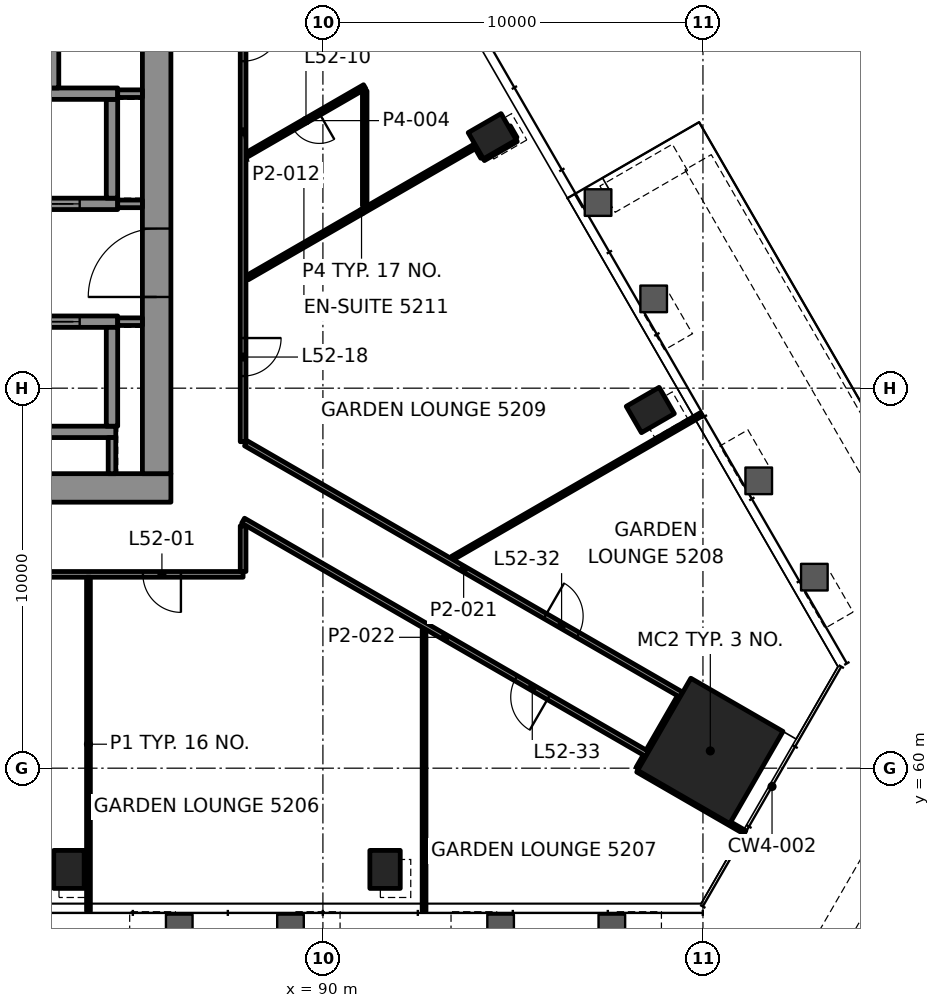
"""IFC4 building model, lengths in metres.
Left out: names, types, materials, properties, quantities, classifications, styles, units other than length and angle.
Written with IfcOpenShell. Run it as: python <this file> out.ifc"""

import sys

from ifc_helpers import new_model, si_unit, direction, frame, frame_2d, origin, origin_2d, place, context, subcontext, project, spatial, rectangle, hollow_rectangle, extrude, element, fill, save


model = new_model("IFC4")
c1 = context("Model", 3, precision=1e-05, world=origin(), true_north=direction((0.0, 1.0)))
c2 = subcontext(c1, "Body", "Model", "MODEL_VIEW")
j1 = project(units=[si_unit("LENGTHUNIT", "METRE"), si_unit("PLANEANGLEUNIT", "RADIAN")], contexts=[c1])
p1 = place(None, origin())
s1 = spatial("IfcSite", under=j1, at=p1, CompositionType="ELEMENT")
p2 = place(p1, origin())
s2 = spatial("IfcBuilding", under=s1, at=p2, CompositionType="ELEMENT")
p3 = place(p2, frame((0.0, 0.0, 222.1)))
s3 = spatial("IfcBuildingStorey", under=s2, at=p3, CompositionType="ELEMENT", Elevation=222.1)
p4 = place(p3, frame((100.194, 60.454, 0.0), z_axis=(0.0, 0.0, 1.0), x_axis=(0.5, 0.866025403784, 0.0)))
e1 = element("IfcColumn", 1, at=p4, inside=s3, PredefinedType="COLUMN", context=c2, shape_type="SweptSolid", body=[
    extrude(rectangle(XDim=2.8, YDim=2.8, at=origin_2d()), origin(), (0.0, 0.0, 1.0), 3.9),
])
for number, where, z_axis, x_axis in (
    (2, (83.318, 57.337, -0.0), (0.0, 0.0, 1.0), (1.0, 0.0, 0.0)),
    (3, (91.635, 57.337, -0.0), (0.0, 0.0, 1.0), (1.0, 0.0, 0.0)),
    (4, (98.615, 69.425, -0.0), (0.0, 0.0, 1.0), (-0.5, 0.866, 0.0)),
    (5, (94.456, 76.628, -0.0), (0.0, 0.0, 1.0), (-0.5, 0.866, 0.0)),
):
    element("IfcColumn", number, at=place(p3, frame(where, z_axis=z_axis, x_axis=x_axis)), inside=s3, PredefinedType="COLUMN", context=c2, shape_type="SweptSolid", body=[
        extrude(hollow_rectangle(XDim=0.8, YDim=1.0, WallThickness=0.05, at=origin_2d()), origin(), (0.0, 0.0, 1.0), 3.9),
    ])
p5 = place(p3, frame((64.0, 67.375, 0.0), z_axis=(0.0, 0.0, 1.0), x_axis=(1.0, 0.0, 0.0)))
e6 = element("IfcWall", 6, at=p5, inside=s3, PredefinedType="SHEAR", context=c2, shape_type="SweptSolid", body=[
    extrude(rectangle(XDim=22.0, YDim=0.75, at=frame_2d((11.0, 0.0))), origin(), (0.0, 0.0, 1.0), 3.7),
])
p6 = place(p5, frame((3.15, 0.0, 0.0)))
e7 = element("IfcOpeningElement", 7, at=p6, cuts=e6, PredefinedType="OPENING", context=c2, shape_type="SweptSolid", body=[
    extrude(rectangle(XDim=0.9, YDim=2.1, at=frame_2d((0.45, 1.05))), frame((0.0, 0.385, 0.0), z_axis=(0.0, -1.0, 0.0), x_axis=(1.0, 0.0, 0.0)), (0.0, 0.0, 1.0), 0.77),
])
p7 = place(p3, frame((85.625, 67.75, 0.0), z_axis=(0.0, 0.0, 1.0), x_axis=(0.0, 1.0, 0.0)))
e8 = element("IfcWall", 8, at=p7, inside=s3, PredefinedType="SHEAR", context=c2, shape_type="SweptSolid", body=[
    extrude(rectangle(XDim=14.5, YDim=0.75, at=frame_2d((7.25, 0.0))), origin(), (0.0, 0.0, 1.0), 3.7),
])
p8 = place(p7, frame((4.65, 0.0, 0.0)))
e9 = element("IfcOpeningElement", 9, at=p8, cuts=e8, PredefinedType="OPENING", context=c2, shape_type="SweptSolid", body=[
    extrude(rectangle(XDim=1.8, YDim=2.1, at=frame_2d((0.9, 1.05))), frame((0.0, 0.385, 0.0), z_axis=(0.0, -1.0, 0.0), x_axis=(1.0, 0.0, 0.0)), (0.0, 0.0, 1.0), 0.77),
])
p9 = place(p7, frame((11.8, 0.0, 0.0)))
e10 = element("IfcOpeningElement", 10, at=p9, cuts=e8, PredefinedType="OPENING", context=c2, shape_type="SweptSolid", body=[
    extrude(rectangle(XDim=0.9, YDim=2.1, at=frame_2d((0.45, 1.05))), frame((0.0, 0.385, 0.0), z_axis=(0.0, -1.0, 0.0), x_axis=(1.0, 0.0, 0.0)), (0.0, 0.0, 1.0), 0.77),
])
p10 = place(p3, frame((70.35, 68.85, 0.0), z_axis=(0.0, 0.0, 1.0), x_axis=(1.0, 0.0, 0.0)))
e11 = element("IfcWall", 11, at=p10, inside=s3, PredefinedType="SHEAR", context=c2, shape_type="SweptSolid", body=[
    extrude(rectangle(XDim=14.2, YDim=0.3, at=frame_2d((7.1, 0.0))), origin(), (0.0, 0.0, 1.0), 3.7),
])
p11 = place(p3, frame((70.3, 71.75, 0.0), z_axis=(0.0, 0.0, 1.0), x_axis=(1.0, 0.0, 0.0)))
e12 = element("IfcWall", 12, at=p11, inside=s3, PredefinedType="SHEAR", context=c2, shape_type="SweptSolid", body=[
    extrude(rectangle(XDim=14.3, YDim=0.3, at=frame_2d((7.15, 0.0))), origin(), (0.0, 0.0, 1.0), 3.7),
])
p12 = place(p11, frame((1.0, 0.0, 0.0)))
e13 = element("IfcOpeningElement", 13, at=p12, cuts=e12, PredefinedType="OPENING", context=c2, shape_type="SweptSolid", body=[
    extrude(rectangle(XDim=1.1, YDim=2.1, at=frame_2d((0.55, 1.05))), frame((0.0, 0.16, 0.0), z_axis=(0.0, -1.0, 0.0), x_axis=(1.0, 0.0, 0.0)), (0.0, 0.0, 1.0), 0.32),
])
p13 = place(p11, frame((3.8, 0.0, 0.0)))
e14 = element("IfcOpeningElement", 14, at=p13, cuts=e12, PredefinedType="OPENING", context=c2, shape_type="SweptSolid", body=[
    extrude(rectangle(XDim=1.1, YDim=2.1, at=frame_2d((0.55, 1.05))), frame((0.0, 0.16, 0.0), z_axis=(0.0, -1.0, 0.0), x_axis=(1.0, 0.0, 0.0)), (0.0, 0.0, 1.0), 0.32),
])
p14 = place(p11, frame((6.6, 0.0, 0.0)))
e15 = element("IfcOpeningElement", 15, at=p14, cuts=e12, PredefinedType="OPENING", context=c2, shape_type="SweptSolid", body=[
    extrude(rectangle(XDim=1.1, YDim=2.1, at=frame_2d((0.55, 1.05))), frame((0.0, 0.16, 0.0), z_axis=(0.0, -1.0, 0.0), x_axis=(1.0, 0.0, 0.0)), (0.0, 0.0, 1.0), 0.32),
])
p15 = place(p11, frame((9.4, 0.0, 0.0)))
e16 = element("IfcOpeningElement", 16, at=p15, cuts=e12, PredefinedType="OPENING", context=c2, shape_type="SweptSolid", body=[
    extrude(rectangle(XDim=1.1, YDim=2.1, at=frame_2d((0.55, 1.05))), frame((0.0, 0.16, 0.0), z_axis=(0.0, -1.0, 0.0), x_axis=(1.0, 0.0, 0.0)), (0.0, 0.0, 1.0), 0.32),
])
p16 = place(p11, frame((12.2, 0.0, 0.0)))
e17 = element("IfcOpeningElement", 17, at=p16, cuts=e12, PredefinedType="OPENING", context=c2, shape_type="SweptSolid", body=[
    extrude(rectangle(XDim=1.1, YDim=2.1, at=frame_2d((0.55, 1.05))), frame((0.0, 0.16, 0.0), z_axis=(0.0, -1.0, 0.0), x_axis=(1.0, 0.0, 0.0)), (0.0, 0.0, 1.0), 0.32),
])
p17 = place(p3, frame((70.3, 74.85, 0.0), z_axis=(0.0, 0.0, 1.0), x_axis=(1.0, 0.0, 0.0)))
e18 = element("IfcWall", 18, at=p17, inside=s3, PredefinedType="SHEAR", context=c2, shape_type="SweptSolid", body=[
    extrude(rectangle(XDim=14.3, YDim=0.3, at=frame_2d((7.15, 0.0))), origin(), (0.0, 0.0, 1.0), 3.7),
])
p18 = place(p17, frame((3.8, 0.0, 0.0)))
e19 = element("IfcOpeningElement", 19, at=p18, cuts=e18, PredefinedType="OPENING", context=c2, shape_type="SweptSolid", body=[
    extrude(rectangle(XDim=1.1, YDim=2.1, at=frame_2d((0.55, 1.05))), frame((0.0, 0.16, 0.0), z_axis=(0.0, -1.0, 0.0), x_axis=(1.0, 0.0, 0.0)), (0.0, 0.0, 1.0), 0.32),
])
p19 = place(p17, frame((12.2, 0.0, 0.0)))
e20 = element("IfcOpeningElement", 20, at=p19, cuts=e18, PredefinedType="OPENING", context=c2, shape_type="SweptSolid", body=[
    extrude(rectangle(XDim=1.1, YDim=2.1, at=frame_2d((0.55, 1.05))), frame((0.0, 0.16, 0.0), z_axis=(0.0, -1.0, 0.0), x_axis=(1.0, 0.0, 0.0)), (0.0, 0.0, 1.0), 0.32),
])
for number, where, z_axis, x_axis in (
    (21, (84.45, 69.0, 0.0), (0.0, 0.0, 1.0), (0.0, 1.0, 0.0)),
    (22, (84.45, 75.0, 0.0), (0.0, 0.0, 1.0), (0.0, 1.0, 0.0)),
):
    element("IfcWall", number, at=place(p3, frame(where, z_axis=z_axis, x_axis=x_axis)), inside=s3, PredefinedType="SHEAR", context=c2, shape_type="SweptSolid", body=[
        extrude(rectangle(XDim=2.6, YDim=0.3, at=frame_2d((1.3, 0.0))), origin(), (0.0, 0.0, 1.0), 3.7),
    ])
p20 = place(p3, frame((67.15, 77.75, 0.0), z_axis=(0.0, 0.0, 1.0), x_axis=(1.0, 0.0, 0.0)))
e23 = element("IfcWall", 23, at=p20, inside=s3, PredefinedType="SHEAR", context=c2, shape_type="SweptSolid", body=[
    extrude(rectangle(XDim=17.45, YDim=0.3, at=frame_2d((8.725, 0.0))), origin(), (0.0, 0.0, 1.0), 3.7),
])
p21 = place(p20, frame((0.545, 0.0, 0.0)))
e24 = element("IfcOpeningElement", 24, at=p21, cuts=e23, PredefinedType="OPENING", context=c2, shape_type="SweptSolid", body=[
    extrude(rectangle(XDim=1.0, YDim=2.1, at=frame_2d((0.5, 1.05))), frame((0.0, 0.16, 0.0), z_axis=(0.0, -1.0, 0.0), x_axis=(1.0, 0.0, 0.0)), (0.0, 0.0, 1.0), 0.32),
])
p22 = place(p3, frame((82.9, 77.9, 0.0), z_axis=(0.0, 0.0, 1.0), x_axis=(0.0, 1.0, 0.0)))
e25 = element("IfcWall", 25, at=p22, inside=s3, PredefinedType="SHEAR", context=c2, shape_type="SweptSolid", body=[
    extrude(rectangle(XDim=3.08, YDim=0.3, at=frame_2d((1.54, 0.0))), origin(), (0.0, 0.0, 1.0), 3.7),
])
p23 = place(p3, frame((87.899, 65.1, 0.0), z_axis=(0.0, 0.0, 1.0), x_axis=(-1.0, 0.0, 0.0)))
e26 = element("IfcWall", 26, at=p23, inside=s3, PredefinedType="PARTITIONING", context=c2, shape_type="SweptSolid", body=[
    extrude(rectangle(XDim=25.799, YDim=0.15, at=frame_2d((12.899, 0.0))), origin(), (0.0, 0.0, 1.0), 3.1),
])
p24 = place(p23, frame((1.636, 0.0, 0.0)))
e27 = element("IfcOpeningElement", 27, at=p24, cuts=e26, PredefinedType="OPENING", context=c2, shape_type="SweptSolid", body=[
    extrude(rectangle(XDim=1.0, YDim=2.1, at=frame_2d((0.5, 1.05))), frame((0.0, 0.085, 0.0), z_axis=(0.0, -1.0, 0.0), x_axis=(1.0, 0.0, 0.0)), (0.0, 0.0, 1.0), 0.17),
])
p25 = place(p23, frame((7.984, 0.0, 0.0)))
e28 = element("IfcOpeningElement", 28, at=p25, cuts=e26, PredefinedType="OPENING", context=c2, shape_type="SweptSolid", body=[
    extrude(rectangle(XDim=1.0, YDim=2.1, at=frame_2d((0.5, 1.05))), frame((0.0, 0.085, 0.0), z_axis=(0.0, -1.0, 0.0), x_axis=(1.0, 0.0, 0.0)), (0.0, 0.0, 1.0), 0.17),
])
p26 = place(p23, frame((16.815, 0.0, 0.0)))
e29 = element("IfcOpeningElement", 29, at=p26, cuts=e26, PredefinedType="OPENING", context=c2, shape_type="SweptSolid", body=[
    extrude(rectangle(XDim=1.0, YDim=2.1, at=frame_2d((0.5, 1.05))), frame((0.0, 0.085, 0.0), z_axis=(0.0, -1.0, 0.0), x_axis=(1.0, 0.0, 0.0)), (0.0, 0.0, 1.0), 0.17),
])
p27 = place(p23, frame((23.163, 0.0, 0.0)))
e30 = element("IfcOpeningElement", 30, at=p27, cuts=e26, PredefinedType="OPENING", context=c2, shape_type="SweptSolid", body=[
    extrude(rectangle(XDim=1.0, YDim=2.1, at=frame_2d((0.5, 1.05))), frame((0.0, 0.085, 0.0), z_axis=(0.0, -1.0, 0.0), x_axis=(1.0, 0.0, 0.0)), (0.0, 0.0, 1.0), 0.17),
])
p28 = place(p3, frame((93.406, 65.529, 0.0), z_axis=(0.0, 0.0, 1.0), x_axis=(0.866032295486, 0.499988063033, 0.0)))
e31 = element("IfcWall", 31, at=p28, inside=s3, PredefinedType="PARTITIONING", context=c2, shape_type="SweptSolid", body=[
    extrude(rectangle(XDim=7.559, YDim=0.1, at=frame_2d((3.779, 0.0))), origin(), (0.0, 0.0, 1.0), 3.1),
])
p29 = place(p3, frame((94.223, 76.032, 0.0), z_axis=(0.0, 0.0, 1.0), x_axis=(0.86597798544, 0.50008212199, 0.0)))
e32 = element("IfcWall", 32, at=p29, inside=s3, PredefinedType="PARTITIONING", context=c2, shape_type="SweptSolid", body=[
    extrude(rectangle(XDim=0.999, YDim=0.1, at=frame_2d((0.5, 0.0))), origin(), (0.0, 0.0, 1.0), 3.022),
])
p30 = place(p3, frame((88.01, 72.906, 0.0), z_axis=(0.0, 0.0, 1.0), x_axis=(0.866025136247, 0.500000463387, 0.0)))
e33 = element("IfcWall", 33, at=p30, inside=s3, PredefinedType="PARTITIONING", context=c2, shape_type="SweptSolid", body=[
    extrude(rectangle(XDim=6.943, YDim=0.12, at=frame_2d((3.471, 0.0))), origin(), (0.0, 0.0, 1.0), 3.1),
])
p31 = place(p3, frame((91.1, 77.933, 0.0), z_axis=(0.0, 0.0, 1.0), x_axis=(-0.866045460162, -0.499965259726, 0.0)))
e34 = element("IfcWall", 34, at=p31, inside=s3, PredefinedType="PARTITIONING", context=c2, shape_type="SweptSolid", body=[
    extrude(rectangle(XDim=3.569, YDim=0.12, at=frame_2d((1.784, 0.0))), origin(), (0.0, 0.0, 1.0), 3.1),
])
p32 = place(p31, frame((1.384, 0.0, 0.0)))
e35 = element("IfcOpeningElement", 35, at=p32, cuts=e34, PredefinedType="OPENING", context=c2, shape_type="SweptSolid", body=[
    extrude(rectangle(XDim=0.8, YDim=2.1, at=frame_2d((0.4, 1.05))), frame((0.0, 0.07, 0.0), z_axis=(0.0, -1.0, 0.0), x_axis=(1.0, 0.0, 0.0)), (0.0, 0.0, 1.0), 0.14),
])
p33 = place(p3, frame((98.306, 59.986, 0.0), z_axis=(0.0, 0.0, 1.0), x_axis=(0.500136362069, 0.865946660792, 0.0)))
e36 = element("IfcWall", 36, at=p33, inside=s3, PredefinedType="PARTITIONING", context=c2, shape_type="SweptSolid", body=[
    extrude(rectangle(XDim=0.375, YDim=0.15, at=frame_2d((0.187, 0.0))), origin(), (0.0, 0.0, 1.0), 3.1),
])
p34 = place(p3, frame((92.662, 56.237, 0.0), z_axis=(0.0, 0.0, 1.0), x_axis=(0.0, 1.0, 0.0)))
e37 = element("IfcWall", 37, at=p34, inside=s3, PredefinedType="PARTITIONING", context=c2, shape_type="SweptSolid", body=[
    extrude(rectangle(XDim=7.41, YDim=0.1, at=frame_2d((3.705, 0.0))), origin(), (0.0, 0.0, 1.0), 3.1),
])
p35 = place(p3, frame((91.1, 74.8, 0.0), z_axis=(0.0, 0.0, 1.0), x_axis=(0.0, 1.0, 0.0)))
e38 = element("IfcWall", 38, at=p35, inside=s3, PredefinedType="PARTITIONING", context=c2, shape_type="SweptSolid", body=[
    extrude(rectangle(XDim=3.023, YDim=0.12, at=frame_2d((1.511, 0.0))), origin(), (0.0, 0.0, 1.0), 3.1),
])
p36 = place(p3, frame((87.9, 65.176, 0.0), z_axis=(0.0, 0.0, 1.0), x_axis=(0.0, 1.0, 0.0)))
e39 = element("IfcWall", 39, at=p36, inside=s3, PredefinedType="PARTITIONING", context=c2, shape_type="SweptSolid", body=[
    extrude(rectangle(XDim=1.201, YDim=0.15, at=frame_2d((0.6, 0.0))), origin(), (0.0, 0.0, 1.0), 2.947),
])
p37 = place(p3, frame((87.9, 84.899, 0.0), z_axis=(0.0, 0.0, 1.0), x_axis=(0.0, -1.0, 0.0)))
e40 = element("IfcWall", 40, at=p37, inside=s3, PredefinedType="PARTITIONING", context=c2, shape_type="SweptSolid", body=[
    extrude(rectangle(XDim=16.308, YDim=0.15, at=frame_2d((8.154, 0.0))), origin(), (0.0, 0.0, 1.0), 3.1),
])
p38 = place(p37, frame((5.294, 0.0, 0.0)))
e41 = element("IfcOpeningElement", 41, at=p38, cuts=e40, PredefinedType="OPENING", context=c2, shape_type="SweptSolid", body=[
    extrude(rectangle(XDim=1.0, YDim=2.1, at=frame_2d((0.5, 1.05))), frame((0.0, 0.085, 0.0), z_axis=(0.0, -1.0, 0.0), x_axis=(1.0, 0.0, 0.0)), (0.0, 0.0, 1.0), 0.17),
])
p39 = place(p37, frame((13.58, 0.0, 0.0)))
e42 = element("IfcOpeningElement", 42, at=p39, cuts=e40, PredefinedType="OPENING", context=c2, shape_type="SweptSolid", body=[
    extrude(rectangle(XDim=1.0, YDim=2.1, at=frame_2d((0.5, 1.05))), frame((0.0, 0.085, 0.0), z_axis=(0.0, -1.0, 0.0), x_axis=(1.0, 0.0, 0.0)), (0.0, 0.0, 1.0), 0.17),
])
p40 = place(p3, frame((83.831, 56.237, 0.0), z_axis=(0.0, 0.0, 1.0), x_axis=(0.0, 1.0, 0.0)))
e43 = element("IfcWall", 43, at=p40, inside=s3, PredefinedType="PARTITIONING", context=c2, shape_type="SweptSolid", body=[
    extrude(rectangle(XDim=8.788, YDim=0.1, at=frame_2d((4.394, 0.0))), origin(), (0.0, 0.0, 1.0), 3.022),
])
p41 = place(p3, frame((95.063, 76.576, 0.0), z_axis=(0.0, 0.0, 1.0), x_axis=(-0.500126092966, 0.865952591736, 0.0)))
e44 = element("IfcWall", 44, at=p41, inside=s3, PredefinedType="PARTITIONING", context=c2, shape_type="SweptSolid", body=[
    extrude(rectangle(XDim=0.349, YDim=0.1, at=frame_2d((0.175, 0.0))), origin(), (0.0, 0.0, 1.0), 3.1),
])
p42 = place(p3, frame((94.197, 76.076, 0.0), z_axis=(0.0, 0.0, 1.0), x_axis=(-0.500136839105, 0.865946385275, 0.0)))
e45 = element("IfcWall", 45, at=p42, inside=s3, PredefinedType="PARTITIONING", context=c2, shape_type="SweptSolid", body=[
    extrude(rectangle(XDim=0.289, YDim=0.1, at=frame_2d((0.145, 0.0))), origin(), (0.0, 0.0, 1.0), 3.1),
])
p43 = place(p3, frame((87.975, 68.548, 0.0), z_axis=(0.0, 0.0, 1.0), x_axis=(0.866030071145, -0.499991915808, 0.0)))
e46 = element("IfcWall", 46, at=p43, inside=s3, PredefinedType="PARTITIONING", context=c2, shape_type="SweptSolid", body=[
    extrude(rectangle(XDim=13.228, YDim=0.15, at=frame_2d((6.614, 0.0))), origin(), (0.0, 0.0, 1.0), 3.1),
])
p44 = place(p43, frame((9.09, 0.0, 0.0)))
e47 = element("IfcOpeningElement", 47, at=p44, cuts=e46, PredefinedType="OPENING", context=c2, shape_type="SweptSolid", body=[
    extrude(rectangle(XDim=1.0, YDim=2.1, at=frame_2d((0.5, 1.05))), frame((0.0, 0.085, 0.0), z_axis=(0.0, -1.0, 0.0), x_axis=(1.0, 0.0, 0.0)), (0.0, 0.0, 1.0), 0.17),
])
p45 = place(p3, frame((98.531, 60.375, 0.0), z_axis=(0.0, 0.0, 1.0), x_axis=(-0.866027942666, 0.499995602502, 0.0)))
e48 = element("IfcWall", 48, at=p45, inside=s3, PredefinedType="PARTITIONING", context=c2, shape_type="SweptSolid", body=[
    extrude(rectangle(XDim=12.276, YDim=0.15, at=frame_2d((6.138, 0.0))), origin(), (0.0, 0.0, 1.0), 2.947),
])
p46 = place(p45, frame((2.99, 0.0, 0.0)))
e49 = element("IfcOpeningElement", 49, at=p46, cuts=e48, PredefinedType="OPENING", context=c2, shape_type="SweptSolid", body=[
    extrude(rectangle(XDim=1.0, YDim=2.1, at=frame_2d((0.5, 1.05))), frame((0.0, 0.085, 0.0), z_axis=(0.0, -1.0, 0.0), x_axis=(1.0, 0.0, 0.0)), (0.0, 0.0, 1.0), 0.17),
])
p47 = place(p3, frame((101.105, 58.312, 0.0), z_axis=(0.0, 0.0, 1.0), x_axis=(-0.866035906198, 0.499981808845, 0.0)))
e50 = element("IfcWall", 50, at=p47, inside=s3, PredefinedType="PARTITIONING", context=c2, shape_type="SweptSolid", body=[
    extrude(rectangle(XDim=3.259, YDim=0.1, at=frame_2d((1.63, 0.0))), origin(), (0.0, 0.0, 1.0), 3.1),
])
p48 = place(p3, frame((98.569, 60.44, 0.0), z_axis=(0.0, 0.0, 1.0), x_axis=(0.500055614084, 0.865993292597, 0.0)))
e51 = element("IfcWall", 51, at=p48, inside=s3, PredefinedType="PARTITIONING", context=c2, shape_type="SweptSolid", body=[
    extrude(rectangle(XDim=1.649, YDim=0.15, at=frame_2d((0.825, 0.0))), origin(), (0.0, 0.0, 1.0), 2.947),
])
p49 = place(p3, frame((102.236, 53.491, 0.0), z_axis=(0.0, 0.0, 1.0), x_axis=(0.50001002959, 0.86601961312, 0.0)))
e52 = element("IfcWall", 52, at=p49, inside=s3, PredefinedType="SOLIDWALL", context=c2, shape_type="SweptSolid", body=[
    extrude(rectangle(XDim=10.019, YDim=0.8, at=frame_2d((5.009, 0.0))), origin(), (0.0, 0.0, 1.0), 0.9),
])
p50 = place(p3, frame((107.245, 63.176, 0.0), z_axis=(0.0, 0.0, 1.0), x_axis=(-0.499998123212, 0.866026487346, 0.0)))
e53 = element("IfcWall", 53, at=p50, inside=s3, PredefinedType="SOLIDWALL", context=c2, shape_type="SweptSolid", body=[
    extrude(rectangle(XDim=14.745, YDim=0.8, at=frame_2d((7.372, 0.0))), origin(), (0.0, 0.0, 1.0), 0.9),
])
p51 = place(p3, frame((99.395, 76.074, 0.0), z_axis=(0.0, 0.0, 1.0), x_axis=(-0.866008176907, -0.50002983664, 0.0)))
e54 = element("IfcWall", 54, at=p51, inside=s3, PredefinedType="SOLIDWALL", context=c2, shape_type="SweptSolid", body=[
    extrude(rectangle(XDim=2.2, YDim=0.8, at=frame_2d((1.1, 0.0))), origin(), (0.0, 0.0, 1.0), 0.9),
])
for number, where, z_axis, x_axis in (
    (55, (84.6, 71.75, 0.0), (0.0, 0.0, 1.0), (1.0, 0.0, 0.0)),
    (56, (84.6, 74.85, 0.0), (0.0, 0.0, 1.0), (1.0, 0.0, 0.0)),
    (57, (84.6, 77.75, 0.0), (0.0, 0.0, 1.0), (1.0, 0.0, 0.0)),
):
    element("IfcWall", number, at=place(p3, frame(where, z_axis=z_axis, x_axis=x_axis)), inside=s3, PredefinedType="PARTITIONING", context=c2, shape_type="SweptSolid", body=[
        extrude(rectangle(XDim=0.65, YDim=0.2, at=frame_2d((0.325, 0.0))), origin(), (0.0, 0.0, 1.0), 3.7),
    ])
p52 = place(p3, frame((84.45, 67.75, 0.0), z_axis=(0.0, 0.0, 1.0), x_axis=(0.0, 1.0, 0.0)))
e58 = element("IfcWall", 58, at=p52, inside=s3, PredefinedType="PARTITIONING", context=c2, shape_type="SweptSolid", body=[
    extrude(rectangle(XDim=0.95, YDim=0.2, at=frame_2d((0.475, 0.0))), origin(), (0.0, 0.0, 1.0), 3.7),
])
p53 = place(p24, origin())
e59 = element("IfcDoor", 59, at=p53, inside=s3, OperationType="SINGLE_SWING_RIGHT", PredefinedType="DOOR", context=c2, shape_type="SweptSolid", body=[
    extrude(rectangle(XDim=1.0, YDim=2.1, at=frame_2d((0.5, 1.05))), frame((0.0, 0.025, 0.0), z_axis=(0.0, -1.0, 0.0), x_axis=(1.0, 0.0, 0.0)), (0.0, 0.0, 1.0), 0.05),
])
fill(e27, e59)
p54 = place(p32, origin())
e60 = element("IfcDoor", 60, at=p54, inside=s3, OperationType="SINGLE_SWING_LEFT", PredefinedType="DOOR", context=c2, shape_type="SweptSolid", body=[
    extrude(rectangle(XDim=0.8, YDim=2.1, at=frame_2d((0.4, 1.05))), frame((0.0, 0.025, 0.0), z_axis=(0.0, -1.0, 0.0), x_axis=(1.0, 0.0, 0.0)), (0.0, 0.0, 1.0), 0.05),
])
fill(e35, e60)
p55 = place(p38, origin())
e61 = element("IfcDoor", 61, at=p55, inside=s3, OperationType="SINGLE_SWING_RIGHT", PredefinedType="DOOR", context=c2, shape_type="SweptSolid", body=[
    extrude(rectangle(XDim=1.0, YDim=2.1, at=frame_2d((0.5, 1.05))), frame((0.0, 0.025, 0.0), z_axis=(0.0, -1.0, 0.0), x_axis=(1.0, 0.0, 0.0)), (0.0, 0.0, 1.0), 0.05),
])
fill(e41, e61)
p56 = place(p39, origin())
e62 = element("IfcDoor", 62, at=p56, inside=s3, OperationType="SINGLE_SWING_LEFT", PredefinedType="DOOR", context=c2, shape_type="SweptSolid", body=[
    extrude(rectangle(XDim=1.0, YDim=2.1, at=frame_2d((0.5, 1.05))), frame((0.0, 0.025, 0.0), z_axis=(0.0, -1.0, 0.0), x_axis=(1.0, 0.0, 0.0)), (0.0, 0.0, 1.0), 0.05),
])
fill(e42, e62)
p57 = place(p44, origin())
e63 = element("IfcDoor", 63, at=p57, inside=s3, OperationType="SINGLE_SWING_RIGHT", PredefinedType="DOOR", context=c2, shape_type="SweptSolid", body=[
    extrude(rectangle(XDim=1.0, YDim=2.1, at=frame_2d((0.5, 1.05))), frame((0.0, 0.025, 0.0), z_axis=(0.0, -1.0, 0.0), x_axis=(1.0, 0.0, 0.0)), (0.0, 0.0, 1.0), 0.05),
])
fill(e47, e63)
p58 = place(p46, origin())
e64 = element("IfcDoor", 64, at=p58, inside=s3, OperationType="SINGLE_SWING_RIGHT", PredefinedType="DOOR", context=c2, shape_type="SweptSolid", body=[
    extrude(rectangle(XDim=1.0, YDim=2.1, at=frame_2d((0.5, 1.05))), frame((0.0, 0.025, 0.0), z_axis=(0.0, -1.0, 0.0), x_axis=(1.0, 0.0, 0.0)), (0.0, 0.0, 1.0), 0.05),
])
fill(e49, e64)
p59 = place(p16, origin())
e65 = element("IfcDoor", 65, at=p59, inside=s3, OperationType="DOUBLE_DOOR_SLIDING", PredefinedType="DOOR", context=c2, shape_type="SweptSolid", body=[
    extrude(rectangle(XDim=1.1, YDim=2.1, at=frame_2d((0.55, 1.05))), frame((0.0, 0.025, 0.0), z_axis=(0.0, -1.0, 0.0), x_axis=(1.0, 0.0, 0.0)), (0.0, 0.0, 1.0), 0.05),
])
fill(e17, e65)
p60 = place(p19, origin())
e66 = element("IfcDoor", 66, at=p60, inside=s3, OperationType="DOUBLE_DOOR_SLIDING", PredefinedType="DOOR", context=c2, shape_type="SweptSolid", body=[
    extrude(rectangle(XDim=1.1, YDim=2.1, at=frame_2d((0.55, 1.05))), frame((0.0, 0.025, 0.0), z_axis=(0.0, -1.0, 0.0), x_axis=(1.0, 0.0, 0.0)), (0.0, 0.0, 1.0), 0.05),
])
fill(e20, e66)
p61 = place(p8, origin())
e67 = element("IfcDoor", 67, at=p61, inside=s3, OperationType="SINGLE_SWING_RIGHT", PredefinedType="DOOR", context=c2, shape_type="SweptSolid", body=[
    extrude(rectangle(XDim=1.8, YDim=2.1, at=frame_2d((0.9, 1.05))), frame((0.0, 0.095, 0.0), z_axis=(0.0, -1.0, 0.0), x_axis=(1.0, 0.0, 0.0)), (0.0, 0.0, 1.0), 0.19),
])
fill(e9, e67)
save(model, sys.argv[1])
